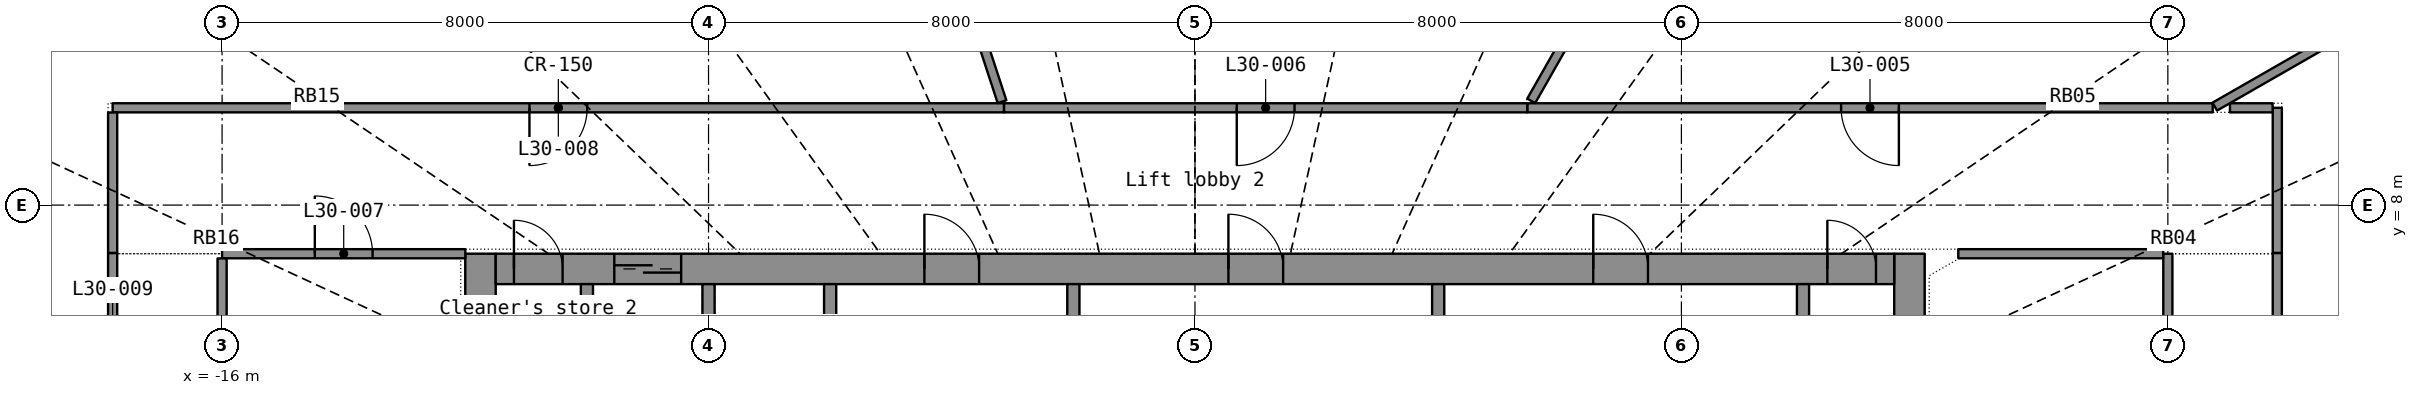
"""IFC4 building model, lengths in metres.
Left out: names, types, materials, properties, quantities, classifications, styles, units other than length and angle.
Written with IfcOpenShell. Run it as: python <this file> out.ifc"""

import sys

from ifc_helpers import new_model, si_unit, direction, frame, frame_2d, origin, place, context, subcontext, project, spatial, rectangle, extrude, element, fill, save


model = new_model("IFC4")
c1 = context("Model", 3, precision=1e-05, world=origin(), true_north=direction((0.0, 1.0)))
c2 = subcontext(c1, "Body", "Model", "MODEL_VIEW")
j1 = project(units=[si_unit("LENGTHUNIT", "METRE"), si_unit("PLANEANGLEUNIT", "RADIAN")], contexts=[c1])
p1 = place(None, origin())
s1 = spatial("IfcSite", under=j1, at=p1, CompositionType="ELEMENT")
p2 = place(p1, origin())
s2 = spatial("IfcBuilding", under=s1, at=p2, CompositionType="ELEMENT")
p3 = place(p2, frame((0.0, 0.0, 126.7)))
s3 = spatial("IfcBuildingStorey", under=s2, at=p3, CompositionType="ELEMENT", Elevation=126.7)
p4 = place(p3, frame((-11.75, -7.2, 0.0), z_axis=(0.0, 0.0, 1.0), x_axis=(0.0, 1.0, 0.0)))
e1 = element("IfcWall", 1, at=p4, inside=s3, PredefinedType="SHEAR", context=c2, shape_type="SweptSolid", body=[
    extrude(rectangle(XDim=14.4, YDim=0.5, at=frame_2d((7.2, 0.0))), origin(), (0.0, 0.0, 1.0), 3.3),
])
p5 = place(p4, frame((6.5, 0.0, 0.0)))
e2 = element("IfcOpeningElement", 2, at=p5, cuts=e1, PredefinedType="OPENING", context=c2, shape_type="SweptSolid", body=[
    extrude(rectangle(XDim=1.4, YDim=2.2, at=frame_2d((0.7, 1.1))), frame((0.0, 0.26, 0.0), z_axis=(0.0, -1.0, 0.0), x_axis=(1.0, 0.0, 0.0)), (0.0, 0.0, 1.0), 0.52),
])
p6 = place(p3, frame((11.75, -7.2, 0.0), z_axis=(0.0, 0.0, 1.0), x_axis=(0.0, 1.0, 0.0)))
e3 = element("IfcWall", 3, at=p6, inside=s3, PredefinedType="SHEAR", context=c2, shape_type="SweptSolid", body=[
    extrude(rectangle(XDim=14.4, YDim=0.5, at=frame_2d((7.2, 0.0))), origin(), (0.0, 0.0, 1.0), 3.3),
])
p7 = place(p6, frame((6.5, 0.0, 0.0)))
e4 = element("IfcOpeningElement", 4, at=p7, cuts=e3, PredefinedType="OPENING", context=c2, shape_type="SweptSolid", body=[
    extrude(rectangle(XDim=1.4, YDim=2.2, at=frame_2d((0.7, 1.1))), frame((0.0, 0.26, 0.0), z_axis=(0.0, -1.0, 0.0), x_axis=(1.0, 0.0, 0.0)), (0.0, 0.0, 1.0), 0.52),
])
p8 = place(p3, frame((-11.5, 6.95, 0.0), z_axis=(0.0, 0.0, 1.0), x_axis=(1.0, 0.0, 0.0)))
e5 = element("IfcWall", 5, at=p8, inside=s3, PredefinedType="SHEAR", context=c2, shape_type="SweptSolid", body=[
    extrude(rectangle(XDim=23.0, YDim=0.5, at=frame_2d((11.5, 0.0))), origin(), (0.0, 0.0, 1.0), 3.3),
])
p9 = place(p8, frame((1.95, 0.0, 0.0)))
e6 = element("IfcOpeningElement", 6, at=p9, cuts=e5, PredefinedType="OPENING", context=c2, shape_type="SweptSolid", body=[
    extrude(rectangle(XDim=1.1, YDim=2.2, at=frame_2d((0.55, 1.1))), frame((0.0, 0.26, 0.0), z_axis=(0.0, -1.0, 0.0), x_axis=(1.0, 0.0, 0.0)), (0.0, 0.0, 1.0), 0.52),
])
p10 = place(p8, frame((7.05, 0.0, 0.0)))
e7 = element("IfcOpeningElement", 7, at=p10, cuts=e5, PredefinedType="OPENING", context=c2, shape_type="SweptSolid", body=[
    extrude(rectangle(XDim=0.9, YDim=2.1, at=frame_2d((0.45, 1.05))), frame((0.0, 0.26, 0.0), z_axis=(0.0, -1.0, 0.0), x_axis=(1.0, 0.0, 0.0)), (0.0, 0.0, 1.0), 0.52),
])
p11 = place(p8, frame((12.05, 0.0, 0.0)))
e8 = element("IfcOpeningElement", 8, at=p11, cuts=e5, PredefinedType="OPENING", context=c2, shape_type="SweptSolid", body=[
    extrude(rectangle(XDim=0.9, YDim=2.1, at=frame_2d((0.45, 1.05))), frame((0.0, 0.26, 0.0), z_axis=(0.0, -1.0, 0.0), x_axis=(1.0, 0.0, 0.0)), (0.0, 0.0, 1.0), 0.52),
])
p12 = place(p8, frame((18.05, 0.0, 0.0)))
e9 = element("IfcOpeningElement", 9, at=p12, cuts=e5, PredefinedType="OPENING", context=c2, shape_type="SweptSolid", body=[
    extrude(rectangle(XDim=0.9, YDim=2.1, at=frame_2d((0.45, 1.05))), frame((0.0, 0.26, 0.0), z_axis=(0.0, -1.0, 0.0), x_axis=(1.0, 0.0, 0.0)), (0.0, 0.0, 1.0), 0.52),
])
p13 = place(p8, frame((0.3, 0.0, 0.0)))
e10 = element("IfcOpeningElement", 10, at=p13, cuts=e5, PredefinedType="OPENING", context=c2, shape_type="SweptSolid", body=[
    extrude(rectangle(XDim=0.8, YDim=2.05, at=frame_2d((0.4, 1.025))), frame((0.0, 0.26, 0.0), z_axis=(0.0, -1.0, 0.0), x_axis=(1.0, 0.0, 0.0)), (0.0, 0.0, 1.0), 0.52),
])
p14 = place(p8, frame((21.9, 0.0, 0.0)))
e11 = element("IfcOpeningElement", 11, at=p14, cuts=e5, PredefinedType="OPENING", context=c2, shape_type="SweptSolid", body=[
    extrude(rectangle(XDim=0.8, YDim=2.05, at=frame_2d((0.4, 1.025))), frame((0.0, 0.26, 0.0), z_axis=(0.0, -1.0, 0.0), x_axis=(1.0, 0.0, 0.0)), (0.0, 0.0, 1.0), 0.52),
])
for number, where, z_axis, x_axis in (
    (12, (-10.0, 3.9, 0.0), (0.0, 0.0, 1.0), (0.0, 1.0, 0.0)),
    (13, (-8.0, 3.9, 0.0), (0.0, 0.0, 1.0), (0.0, 1.0, 0.0)),
    (14, (-6.0, 3.9, 0.0), (0.0, 0.0, 1.0), (0.0, 1.0, 0.0)),
    (15, (10.0, 3.9, 0.0), (0.0, 0.0, 1.0), (0.0, 1.0, 0.0)),
):
    element("IfcWall", number, at=place(p3, frame(where, z_axis=z_axis, x_axis=x_axis)), inside=s3, PredefinedType="SHEAR", context=c2, shape_type="SweptSolid", body=[
        extrude(rectangle(XDim=2.8, YDim=0.2, at=frame_2d((1.4, 0.0))), origin(), (0.0, 0.0, 1.0), 3.3),
    ])
for number, where, z_axis, x_axis in (
    (16, (-2.0, 3.9, 0.0), (0.0, 0.0, 1.0), (0.0, 1.0, 0.0)),
    (17, (4.0, 3.9, 0.0), (0.0, 0.0, 1.0), (0.0, 1.0, 0.0)),
):
    element("IfcWall", number, at=place(p3, frame(where, z_axis=z_axis, x_axis=x_axis)), inside=s3, PredefinedType="PARTITIONING", context=c2, shape_type="SweptSolid", body=[
        extrude(rectangle(XDim=2.8, YDim=0.2, at=frame_2d((1.4, 0.0))), origin(), (0.0, 0.0, 1.0), 3.3),
    ])
p15 = place(p3, frame((-3.14, 9.6, 0.0), z_axis=(0.0, 0.0, 1.0), x_axis=(-1.0, 0.0, 0.0)))
e18 = element("IfcWall", 18, at=p15, inside=s3, PredefinedType="PARTITIONING", context=c2, shape_type="SweptSolid", body=[
    extrude(rectangle(XDim=14.66, YDim=0.15, at=frame_2d((7.33, 0.0))), origin(), (0.0, 0.0, 1.0), 2.4),
])
p16 = place(p15, frame((6.855, 0.0, 0.0)))
e19 = element("IfcOpeningElement", 19, at=p16, cuts=e18, PredefinedType="OPENING", context=c2, shape_type="SweptSolid", body=[
    extrude(rectangle(XDim=0.95, YDim=2.15, at=frame_2d((0.475, 1.075))), frame((0.0, 0.085, 0.0), z_axis=(0.0, -1.0, 0.0), x_axis=(1.0, 0.0, 0.0)), (0.0, 0.0, 1.0), 0.17),
])
p17 = place(p3, frame((16.738, 9.6, 0.0), z_axis=(0.0, 0.0, 1.0), x_axis=(-1.0, 0.0, 0.0)))
e20 = element("IfcWall", 20, at=p17, inside=s3, PredefinedType="PARTITIONING", context=c2, shape_type="SweptSolid", body=[
    extrude(rectangle(XDim=11.273, YDim=0.15, at=frame_2d((5.636, 0.0))), origin(), (0.0, 0.0, 1.0), 2.4),
])
p18 = place(p17, frame((5.161, 0.0, 0.0)))
e21 = element("IfcOpeningElement", 21, at=p18, cuts=e20, PredefinedType="OPENING", context=c2, shape_type="SweptSolid", body=[
    extrude(rectangle(XDim=0.95, YDim=2.15, at=frame_2d((0.475, 1.075))), frame((0.0, 0.085, 0.0), z_axis=(0.0, -1.0, 0.0), x_axis=(1.0, 0.0, 0.0)), (0.0, 0.0, 1.0), 0.17),
])
p19 = place(p3, frame((-6.49, 19.841, 0.0), z_axis=(0.0, 0.0, 1.0), x_axis=(0.310902644, -0.950441763, 0.0)))
e22 = element("IfcWall", 22, at=p19, inside=s3, PredefinedType="PARTITIONING", context=c2, shape_type="SweptSolid", body=[
    extrude(rectangle(XDim=10.669, YDim=0.15, at=frame_2d((5.335, 0.0))), origin(), (0.0, 0.0, 1.0), 2.4),
])
p20 = place(p3, frame((10.598, 18.617, 0.0), z_axis=(0.0, 0.0, 1.0), x_axis=(-0.494739643, -0.869041245, 0.0)))
e23 = element("IfcWall", 23, at=p20, inside=s3, PredefinedType="PARTITIONING", context=c2, shape_type="SweptSolid", body=[
    extrude(rectangle(XDim=10.245, YDim=0.15, at=frame_2d((5.123, 0.0))), origin(), (0.0, 0.0, 1.0), 2.4),
])
p21 = place(p3, frame((5.464, 9.6, 0.0), z_axis=(0.0, 0.0, 1.0), x_axis=(-1.0, 0.0, 0.0)))
e24 = element("IfcWall", 24, at=p21, inside=s3, PredefinedType="PARTITIONING", context=c2, shape_type="SweptSolid", body=[
    extrude(rectangle(XDim=8.604, YDim=0.15, at=frame_2d((4.302, 0.0))), origin(), (0.0, 0.0, 1.0), 2.4),
])
p22 = place(p21, frame((3.827, 0.0, 0.0)))
e25 = element("IfcOpeningElement", 25, at=p22, cuts=e24, PredefinedType="OPENING", context=c2, shape_type="SweptSolid", body=[
    extrude(rectangle(XDim=0.95, YDim=2.15, at=frame_2d((0.475, 1.075))), frame((0.0, 0.085, 0.0), z_axis=(0.0, -1.0, 0.0), x_axis=(1.0, 0.0, 0.0)), (0.0, 0.0, 1.0), 0.17),
])
p23 = place(p3, frame((17.8, -1.276, 0.0), z_axis=(0.0, 0.0, 1.0), x_axis=(0.0, 1.0, 0.0)))
e26 = element("IfcWall", 26, at=p23, inside=s3, PredefinedType="PARTITIONING", context=c2, shape_type="SweptSolid", body=[
    extrude(rectangle(XDim=8.488, YDim=0.15, at=frame_2d((4.244, 0.0))), origin(), (0.0, 0.0, 1.0), 2.4),
])
p24 = place(p23, frame((3.769, 0.0, 0.0)))
e27 = element("IfcOpeningElement", 27, at=p24, cuts=e26, PredefinedType="OPENING", context=c2, shape_type="SweptSolid", body=[
    extrude(rectangle(XDim=0.95, YDim=2.15, at=frame_2d((0.475, 1.075))), frame((0.0, 0.085, 0.0), z_axis=(0.0, -1.0, 0.0), x_axis=(1.0, 0.0, 0.0)), (0.0, 0.0, 1.0), 0.17),
])
p25 = place(p3, frame((16.0, 7.2, 0.0), z_axis=(0.0, 0.0, 1.0), x_axis=(0.0, -1.0, 0.0)))
e28 = element("IfcWall", 28, at=p25, inside=s3, PredefinedType="PARTITIONING", context=c2, shape_type="SweptSolid", body=[
    extrude(rectangle(XDim=6.3, YDim=0.15, at=frame_2d((3.15, 0.0))), origin(), (0.0, 0.0, 1.0), 2.4),
])
p26 = place(p25, frame((2.675, 0.0, 0.0)))
e29 = element("IfcOpeningElement", 29, at=p26, cuts=e28, PredefinedType="OPENING", context=c2, shape_type="SweptSolid", body=[
    extrude(rectangle(XDim=0.95, YDim=2.15, at=frame_2d((0.475, 1.075))), frame((0.0, 0.085, 0.0), z_axis=(0.0, -1.0, 0.0), x_axis=(1.0, 0.0, 0.0)), (0.0, 0.0, 1.0), 0.17),
])
p27 = place(p3, frame((20.553, 11.788, 0.0), z_axis=(0.0, 0.0, 1.0), x_axis=(-0.86746307, -0.497501581, 0.0)))
e30 = element("IfcWall", 30, at=p27, inside=s3, PredefinedType="PARTITIONING", context=c2, shape_type="SweptSolid", body=[
    extrude(rectangle(XDim=4.359, YDim=0.15, at=frame_2d((2.179, 0.0))), origin(), (0.0, 0.0, 1.0), 2.4),
])
p28 = place(p3, frame((-16.0, 7.2, 0.0), z_axis=(0.0, 0.0, 1.0), x_axis=(1.0, 0.0, 0.0)))
e31 = element("IfcWall", 31, at=p28, inside=s3, PredefinedType="PARTITIONING", context=c2, shape_type="SweptSolid", body=[
    extrude(rectangle(XDim=4.0, YDim=0.15, at=frame_2d((2.0, 0.0))), origin(), (0.0, 0.0, 1.0), 2.4),
])
p29 = place(p28, frame((1.525, 0.0, 0.0)))
e32 = element("IfcOpeningElement", 32, at=p29, cuts=e31, PredefinedType="OPENING", context=c2, shape_type="SweptSolid", body=[
    extrude(rectangle(XDim=0.95, YDim=2.15, at=frame_2d((0.475, 1.075))), frame((0.0, 0.085, 0.0), z_axis=(0.0, -1.0, 0.0), x_axis=(1.0, 0.0, 0.0)), (0.0, 0.0, 1.0), 0.17),
])
p30 = place(p3, frame((-16.0, 3.587, 0.0), z_axis=(0.0, 0.0, 1.0), x_axis=(0.0, 1.0, 0.0)))
e33 = element("IfcWall", 33, at=p30, inside=s3, PredefinedType="PARTITIONING", context=c2, shape_type="SweptSolid", body=[
    extrude(rectangle(XDim=3.536, YDim=0.15, at=frame_2d((1.768, 0.0))), origin(), (0.0, 0.0, 1.0), 2.4),
])
p31 = place(p3, frame((12.553, 7.2, 0.0), z_axis=(0.0, 0.0, 1.0), x_axis=(1.0, 0.0, 0.0)))
e34 = element("IfcWall", 34, at=p31, inside=s3, PredefinedType="PARTITIONING", context=c2, shape_type="SweptSolid", body=[
    extrude(rectangle(XDim=3.37, YDim=0.15, at=frame_2d((1.685, 0.0))), origin(), (0.0, 0.0, 1.0), 2.4),
])
p32 = place(p3, frame((-17.8, 7.212, 0.0), z_axis=(0.0, 0.0, 1.0), x_axis=(0.0, -1.0, 0.0)))
e35 = element("IfcWall", 35, at=p32, inside=s3, PredefinedType="PARTITIONING", context=c2, shape_type="SweptSolid", body=[
    extrude(rectangle(XDim=3.21, YDim=0.15, at=frame_2d((1.605, 0.0))), origin(), (0.0, 0.0, 1.0), 2.4),
])
p33 = place(p32, frame((1.13, 0.0, 0.0)))
e36 = element("IfcOpeningElement", 36, at=p33, cuts=e35, PredefinedType="OPENING", context=c2, shape_type="SweptSolid", body=[
    extrude(rectangle(XDim=0.95, YDim=2.15, at=frame_2d((0.475, 1.075))), frame((0.0, 0.085, 0.0), z_axis=(0.0, -1.0, 0.0), x_axis=(1.0, 0.0, 0.0)), (0.0, 0.0, 1.0), 0.17),
])
p34 = place(p3, frame((-17.8, 9.523, 0.0), z_axis=(0.0, 0.0, 1.0), x_axis=(0.0, -1.0, 0.0)))
e37 = element("IfcWall", 37, at=p34, inside=s3, PredefinedType="PARTITIONING", context=c2, shape_type="SweptSolid", body=[
    extrude(rectangle(XDim=2.31, YDim=0.15, at=frame_2d((1.155, 0.0))), origin(), (0.0, 0.0, 1.0), 2.4),
])
p35 = place(p3, frame((17.8, 7.213, 0.0), z_axis=(0.0, 0.0, 1.0), x_axis=(0.0, 1.0, 0.0)))
e38 = element("IfcWall", 38, at=p35, inside=s3, PredefinedType="PARTITIONING", context=c2, shape_type="SweptSolid", body=[
    extrude(rectangle(XDim=2.387, YDim=0.15, at=frame_2d((1.194, 0.0))), origin(), (0.0, 0.0, 1.0), 2.4),
])
p36 = place(p3, frame((17.723, 9.6, 0.0), z_axis=(0.0, 0.0, 1.0), x_axis=(-1.0, 0.0, 0.0)))
e39 = element("IfcWall", 39, at=p36, inside=s3, PredefinedType="PARTITIONING", context=c2, shape_type="SweptSolid", body=[
    extrude(rectangle(XDim=0.701, YDim=0.15, at=frame_2d((0.351, 0.0))), origin(), (0.0, 0.0, 1.0), 2.4),
])
p37 = place(p9, origin())
e40 = element("IfcDoor", 40, at=p37, inside=s3, OperationType="DOUBLE_DOOR_SLIDING", PredefinedType="DOOR", context=c2, shape_type="SweptSolid", body=[
    extrude(rectangle(XDim=1.1, YDim=2.2, at=frame_2d((0.55, 1.1))), frame((0.0, 0.025, 0.0), z_axis=(0.0, -1.0, 0.0), x_axis=(1.0, 0.0, 0.0)), (0.0, 0.0, 1.0), 0.05),
])
fill(e6, e40)
p38 = place(p10, origin())
e41 = element("IfcDoor", 41, at=p38, inside=s3, OperationType="SINGLE_SWING_LEFT", PredefinedType="DOOR", context=c2, shape_type="SweptSolid", body=[
    extrude(rectangle(XDim=0.9, YDim=2.1, at=frame_2d((0.45, 1.05))), frame((0.0, 0.025, 0.0), z_axis=(0.0, -1.0, 0.0), x_axis=(1.0, 0.0, 0.0)), (0.0, 0.0, 1.0), 0.05),
])
fill(e7, e41)
p39 = place(p11, origin())
e42 = element("IfcDoor", 42, at=p39, inside=s3, OperationType="SINGLE_SWING_LEFT", PredefinedType="DOOR", context=c2, shape_type="SweptSolid", body=[
    extrude(rectangle(XDim=0.9, YDim=2.1, at=frame_2d((0.45, 1.05))), frame((0.0, 0.025, 0.0), z_axis=(0.0, -1.0, 0.0), x_axis=(1.0, 0.0, 0.0)), (0.0, 0.0, 1.0), 0.05),
])
fill(e8, e42)
p40 = place(p12, origin())
e43 = element("IfcDoor", 43, at=p40, inside=s3, OperationType="SINGLE_SWING_LEFT", PredefinedType="DOOR", context=c2, shape_type="SweptSolid", body=[
    extrude(rectangle(XDim=0.9, YDim=2.1, at=frame_2d((0.45, 1.05))), frame((0.0, 0.025, 0.0), z_axis=(0.0, -1.0, 0.0), x_axis=(1.0, 0.0, 0.0)), (0.0, 0.0, 1.0), 0.05),
])
fill(e9, e43)
p41 = place(p13, origin())
e44 = element("IfcDoor", 44, at=p41, inside=s3, OperationType="SINGLE_SWING_LEFT", PredefinedType="DOOR", context=c2, shape_type="SweptSolid", body=[
    extrude(rectangle(XDim=0.8, YDim=2.05, at=frame_2d((0.4, 1.025))), frame((0.0, 0.025, 0.0), z_axis=(0.0, -1.0, 0.0), x_axis=(1.0, 0.0, 0.0)), (0.0, 0.0, 1.0), 0.05),
])
fill(e10, e44)
p42 = place(p14, origin())
e45 = element("IfcDoor", 45, at=p42, inside=s3, OperationType="SINGLE_SWING_LEFT", PredefinedType="DOOR", context=c2, shape_type="SweptSolid", body=[
    extrude(rectangle(XDim=0.8, YDim=2.05, at=frame_2d((0.4, 1.025))), frame((0.0, 0.025, 0.0), z_axis=(0.0, -1.0, 0.0), x_axis=(1.0, 0.0, 0.0)), (0.0, 0.0, 1.0), 0.05),
])
fill(e11, e45)
p43 = place(p18, origin())
e46 = element("IfcDoor", 46, at=p43, inside=s3, OperationType="SINGLE_SWING_LEFT", PredefinedType="DOOR", context=c2, shape_type="SweptSolid", body=[
    extrude(rectangle(XDim=0.95, YDim=2.15, at=frame_2d((0.475, 1.075))), frame((0.0, 0.025, 0.0), z_axis=(0.0, -1.0, 0.0), x_axis=(1.0, 0.0, 0.0)), (0.0, 0.0, 1.0), 0.05),
])
fill(e21, e46)
p44 = place(p22, origin())
e47 = element("IfcDoor", 47, at=p44, inside=s3, OperationType="SINGLE_SWING_RIGHT", PredefinedType="DOOR", context=c2, shape_type="SweptSolid", body=[
    extrude(rectangle(XDim=0.95, YDim=2.15, at=frame_2d((0.475, 1.075))), frame((0.0, 0.025, 0.0), z_axis=(0.0, -1.0, 0.0), x_axis=(1.0, 0.0, 0.0)), (0.0, 0.0, 1.0), 0.05),
])
fill(e25, e47)
p45 = place(p29, origin())
e48 = element("IfcDoor", 48, at=p45, inside=s3, OperationType="SINGLE_SWING_LEFT", PredefinedType="DOOR", context=c2, shape_type="SweptSolid", body=[
    extrude(rectangle(XDim=0.95, YDim=2.15, at=frame_2d((0.475, 1.075))), frame((0.0, 0.025, 0.0), z_axis=(0.0, -1.0, 0.0), x_axis=(1.0, 0.0, 0.0)), (0.0, 0.0, 1.0), 0.05),
])
fill(e32, e48)
p46 = place(p16, origin())
e49 = element("IfcDoor", 49, at=p46, inside=s3, OperationType="SINGLE_SWING_RIGHT", PredefinedType="DOOR", context=c2, shape_type="SweptSolid", body=[
    extrude(rectangle(XDim=0.95, YDim=2.15, at=frame_2d((0.475, 1.075))), frame((0.0, 0.025, 0.0), z_axis=(0.0, -1.0, 0.0), x_axis=(1.0, 0.0, 0.0)), (0.0, 0.0, 1.0), 0.05),
])
fill(e19, e49)
save(model, sys.argv[1])
